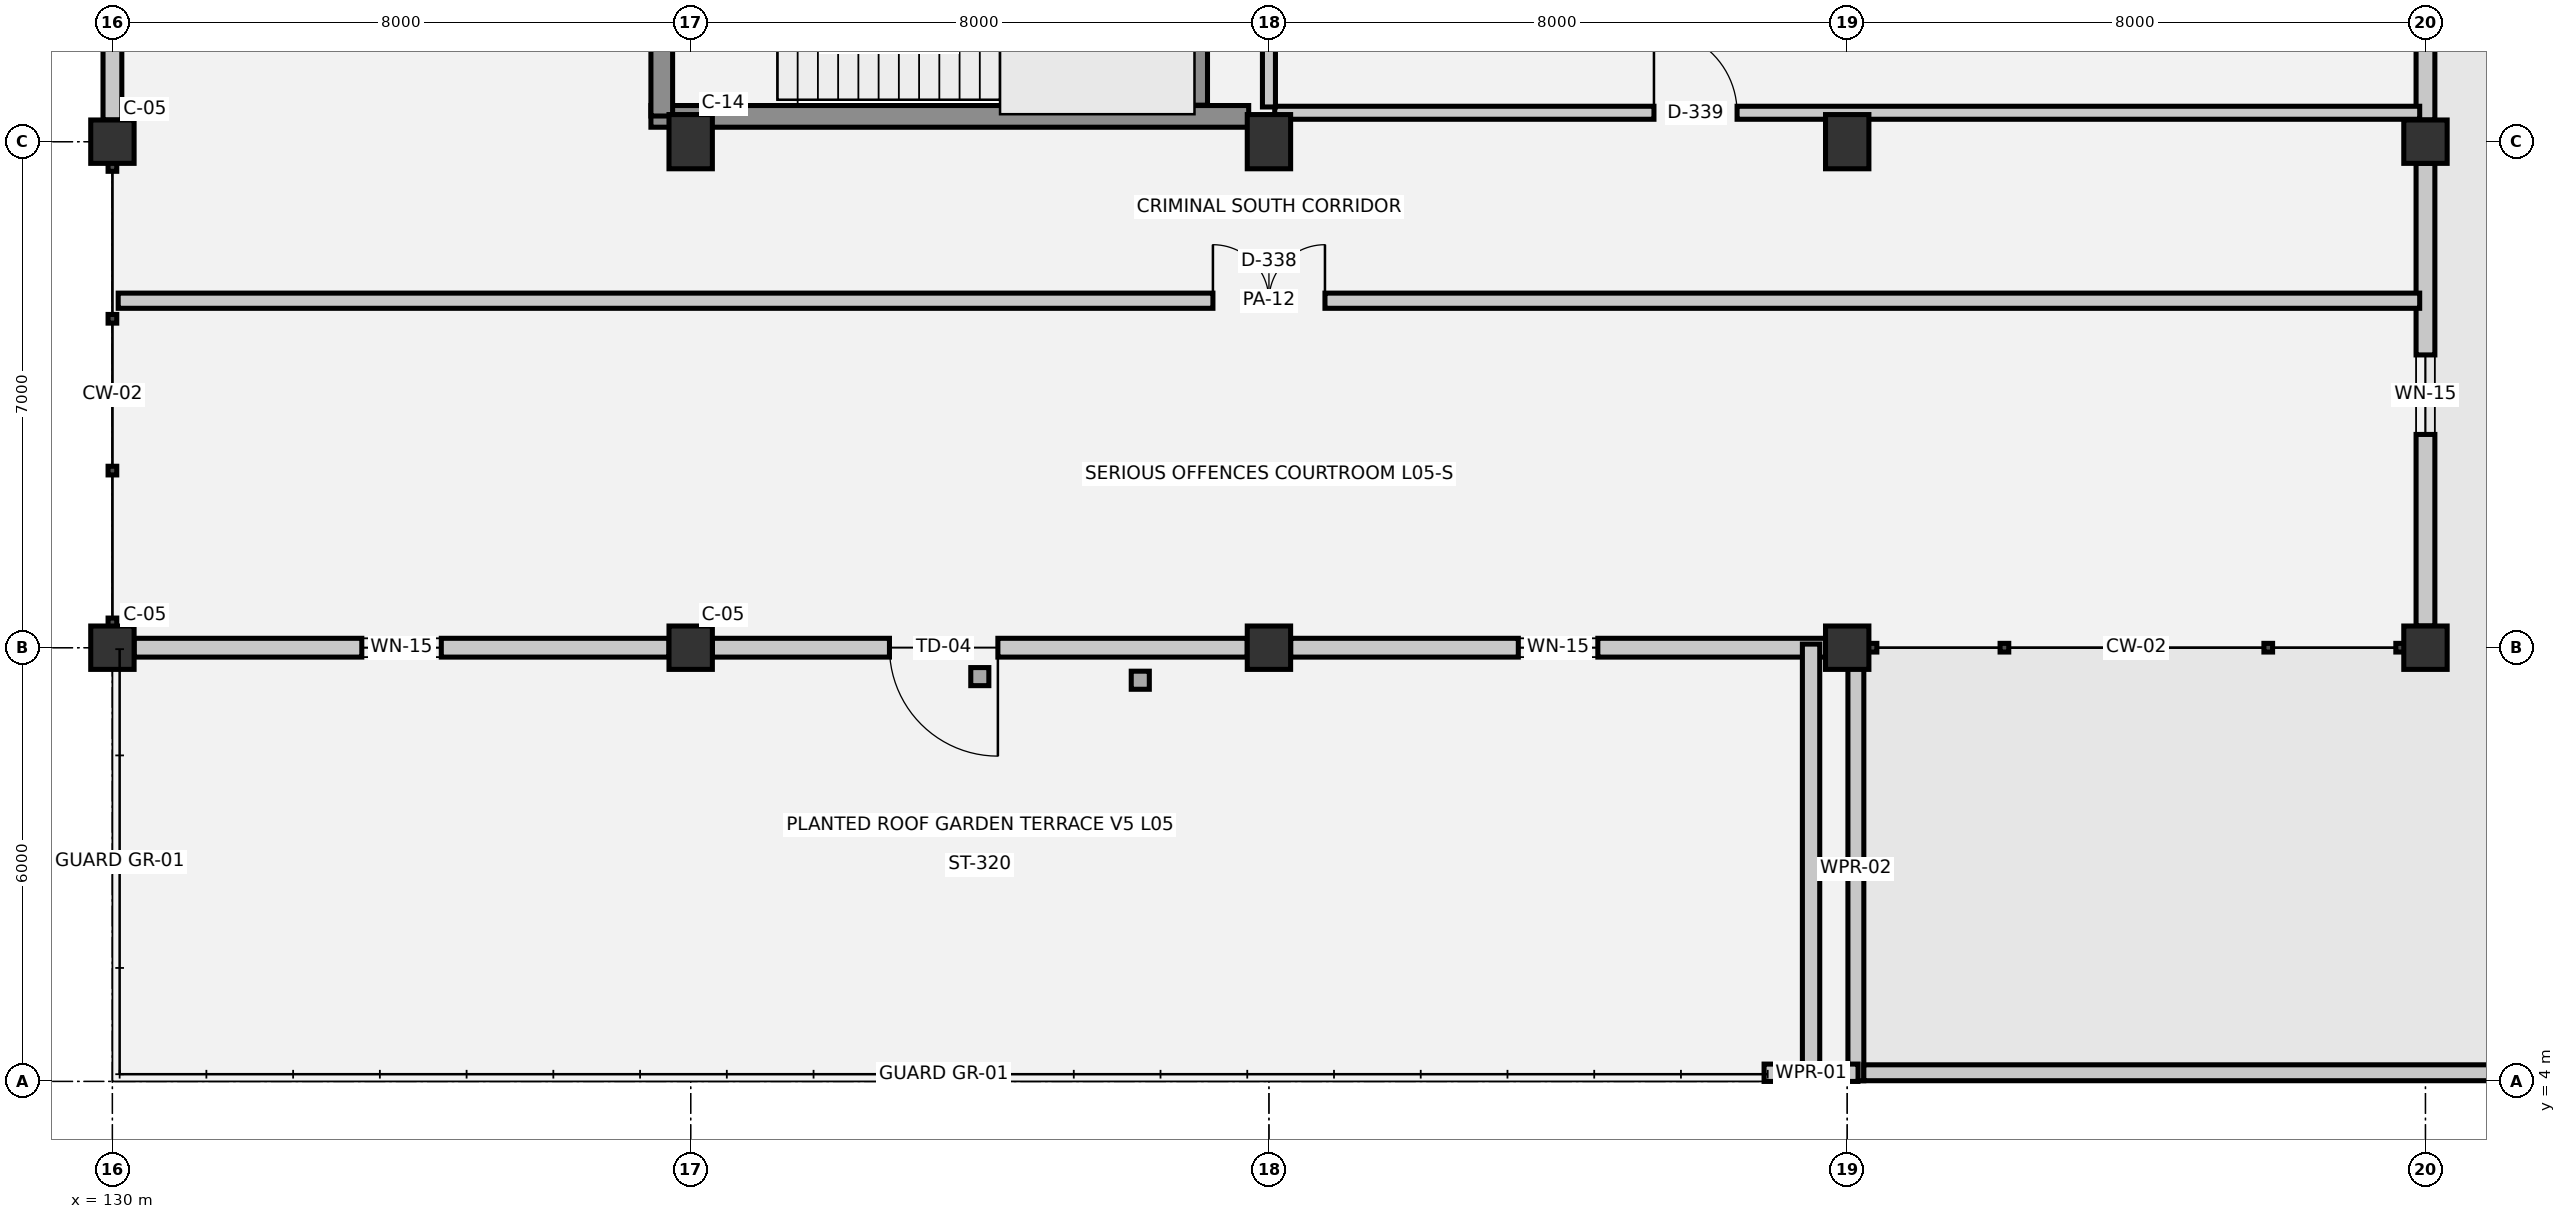
"""IFC4 building model, lengths in metres.
Left out: names, types, materials, properties, quantities, classifications, styles, units other than length and angle.
Written with IfcOpenShell. Run it as: python <this file> out.ifc"""

import sys

from ifc_helpers import new_model, si_unit, direction, frame, frame_2d, origin, origin_2d, place, context, subcontext, project, spatial, rectangle, extrude, element, fill, save


model = new_model("IFC4")
c1 = context("Model", 3, precision=1e-05, world=origin(), true_north=direction((0.0, 1.0)))
c2 = subcontext(c1, "Body", "Model", "MODEL_VIEW")
j1 = project(units=[si_unit("LENGTHUNIT", "METRE"), si_unit("PLANEANGLEUNIT", "RADIAN")], contexts=[c1])
p1 = place(None, origin())
s1 = spatial("IfcSite", under=j1, at=p1, CompositionType="ELEMENT")
p2 = place(p1, origin())
s2 = spatial("IfcBuilding", under=s1, at=p2, CompositionType="ELEMENT")
p3 = place(p2, frame((0.0, 0.0, 18.3)))
s3 = spatial("IfcBuildingStorey", under=s2, at=p3, CompositionType="ELEMENT", Elevation=18.3)
for number, where, z_axis, x_axis in (
    (1, (130.0, 10.0, 0.0), (0.0, 0.0, 1.0), (1.0, 0.0, 0.0)),
    (2, (130.0, 17.0, 0.0), (0.0, 0.0, 1.0), (1.0, 0.0, 0.0)),
    (3, (138.0, 10.0, 0.0), (0.0, 0.0, 1.0), (1.0, 0.0, 0.0)),
):
    element("IfcColumn", number, at=place(p3, frame(where, z_axis=z_axis, x_axis=x_axis)), inside=s3, PredefinedType="COLUMN", context=c2, shape_type="SweptSolid", body=[
        extrude(rectangle(XDim=0.6, YDim=0.6, at=origin_2d()), origin(), (0.0, 0.0, 1.0), 3.75),
    ])
p4 = place(p3, frame((138.0, 17.0, 0.0), z_axis=(0.0, 0.0, 1.0), x_axis=(1.0, 0.0, 0.0)))
e4 = element("IfcColumn", 4, at=p4, inside=s3, PredefinedType="COLUMN", context=c2, shape_type="SweptSolid", body=[
    extrude(rectangle(XDim=0.6, YDim=0.75, at=origin_2d()), origin(), (0.0, 0.0, 1.0), 3.75),
])
p5 = place(p3, frame((146.0, 10.0, 0.0), z_axis=(0.0, 0.0, 1.0), x_axis=(1.0, 0.0, 0.0)))
e5 = element("IfcColumn", 5, at=p5, inside=s3, PredefinedType="COLUMN", context=c2, shape_type="SweptSolid", body=[
    extrude(rectangle(XDim=0.6, YDim=0.6, at=origin_2d()), origin(), (0.0, 0.0, 1.0), 3.75),
])
p6 = place(p3, frame((146.0, 17.0, 0.0), z_axis=(0.0, 0.0, 1.0), x_axis=(1.0, 0.0, 0.0)))
e6 = element("IfcColumn", 6, at=p6, inside=s3, PredefinedType="COLUMN", context=c2, shape_type="SweptSolid", body=[
    extrude(rectangle(XDim=0.6, YDim=0.75, at=origin_2d()), origin(), (0.0, 0.0, 1.0), 3.75),
])
p7 = place(p3, frame((154.0, 10.0, 0.0), z_axis=(0.0, 0.0, 1.0), x_axis=(1.0, 0.0, 0.0)))
e7 = element("IfcColumn", 7, at=p7, inside=s3, PredefinedType="COLUMN", context=c2, shape_type="SweptSolid", body=[
    extrude(rectangle(XDim=0.6, YDim=0.6, at=origin_2d()), origin(), (0.0, 0.0, 1.0), 3.75),
])
p8 = place(p3, frame((154.0, 17.0, 0.0), z_axis=(0.0, 0.0, 1.0), x_axis=(1.0, 0.0, 0.0)))
e8 = element("IfcColumn", 8, at=p8, inside=s3, PredefinedType="COLUMN", context=c2, shape_type="SweptSolid", body=[
    extrude(rectangle(XDim=0.6, YDim=0.75, at=origin_2d()), origin(), (0.0, 0.0, 1.0), 3.75),
])
for number, where, z_axis, x_axis in (
    (9, (162.0, 10.0, 0.0), (0.0, 0.0, 1.0), (1.0, 0.0, 0.0)),
    (10, (162.0, 17.0, 0.0), (0.0, 0.0, 1.0), (1.0, 0.0, 0.0)),
):
    element("IfcColumn", number, at=place(p3, frame(where, z_axis=z_axis, x_axis=x_axis)), inside=s3, PredefinedType="COLUMN", context=c2, shape_type="SweptSolid", body=[
        extrude(rectangle(XDim=0.6, YDim=0.6, at=origin_2d()), origin(), (0.0, 0.0, 1.0), 3.75),
    ])
p9 = place(p3, frame((130.0, 17.3, 0.0), z_axis=(0.0, 0.0, 1.0), x_axis=(0.0, 1.0, 0.0)))
e11 = element("IfcWall", 11, at=p9, inside=s3, PredefinedType="SOLIDWALL", context=c2, shape_type="SweptSolid", body=[
    extrude(rectangle(XDim=7.4, YDim=0.26, at=frame_2d((3.7, 0.0))), origin(), (0.0, 0.0, 1.0), 2.55),
])
p10 = place(p9, frame((3.15, 0.0, 0.9)))
e12 = element("IfcOpeningElement", 12, at=p10, cuts=e11, PredefinedType="OPENING", context=c2, shape_type="SweptSolid", body=[
    extrude(rectangle(XDim=1.1, YDim=1.2, at=frame_2d((0.55, 0.6))), frame((0.0, 0.14, 0.0), z_axis=(0.0, -1.0, 0.0), x_axis=(1.0, 0.0, 0.0)), (0.0, 0.0, 1.0), 0.28),
])
p11 = place(p3, frame((162.0, 24.7, 0.0), z_axis=(0.0, 0.0, 1.0), x_axis=(0.0, -1.0, 0.0)))
e13 = element("IfcWall", 13, at=p11, inside=s3, PredefinedType="SOLIDWALL", context=c2, shape_type="SweptSolid", body=[
    extrude(rectangle(XDim=7.4, YDim=0.26, at=frame_2d((3.7, 0.0))), origin(), (0.0, 0.0, 1.0), 2.55),
])
p12 = place(p11, frame((3.15, 0.0, 1.0)))
e14 = element("IfcOpeningElement", 14, at=p12, cuts=e13, PredefinedType="OPENING", context=c2, shape_type="SweptSolid", body=[
    extrude(rectangle(XDim=1.1, YDim=1.2, at=frame_2d((0.55, 0.6))), frame((0.0, 0.14, 0.0), z_axis=(0.0, -1.0, 0.0), x_axis=(1.0, 0.0, 0.0)), (0.0, 0.0, 1.0), 0.28),
])
p13 = place(p3, frame((162.0, 16.7, 0.0), z_axis=(0.0, 0.0, 1.0), x_axis=(0.0, -1.0, 0.0)))
e15 = element("IfcWall", 15, at=p13, inside=s3, PredefinedType="SOLIDWALL", context=c2, shape_type="SweptSolid", body=[
    extrude(rectangle(XDim=6.4, YDim=0.26, at=frame_2d((3.2, 0.0))), origin(), (0.0, 0.0, 1.0), 2.55),
])
p14 = place(p13, frame((2.65, 0.0, 1.0)))
e16 = element("IfcOpeningElement", 16, at=p14, cuts=e15, PredefinedType="OPENING", context=c2, shape_type="SweptSolid", body=[
    extrude(rectangle(XDim=1.1, YDim=1.2, at=frame_2d((0.55, 0.6))), frame((0.0, 0.14, 0.0), z_axis=(0.0, -1.0, 0.0), x_axis=(1.0, 0.0, 0.0)), (0.0, 0.0, 1.0), 0.28),
])
p15 = place(p3, frame((153.7, 10.0, 0.0), z_axis=(0.0, 0.0, 1.0), x_axis=(-1.0, 0.0, 0.0)))
e17 = element("IfcWall", 17, at=p15, inside=s3, PredefinedType="SOLIDWALL", context=c2, shape_type="SweptSolid", body=[
    extrude(rectangle(XDim=7.4, YDim=0.26, at=frame_2d((3.7, 0.0))), origin(), (0.0, 0.0, 1.0), 2.55),
])
p16 = place(p15, frame((3.15, 0.0, 0.9)))
e18 = element("IfcOpeningElement", 18, at=p16, cuts=e17, PredefinedType="OPENING", context=c2, shape_type="SweptSolid", body=[
    extrude(rectangle(XDim=1.1, YDim=1.2, at=frame_2d((0.55, 0.6))), frame((0.0, 0.14, 0.0), z_axis=(0.0, -1.0, 0.0), x_axis=(1.0, 0.0, 0.0)), (0.0, 0.0, 1.0), 0.28),
])
p17 = place(p3, frame((145.7, 10.0, 0.0), z_axis=(0.0, 0.0, 1.0), x_axis=(-1.0, 0.0, 0.0)))
e19 = element("IfcWall", 19, at=p17, inside=s3, PredefinedType="SOLIDWALL", context=c2, shape_type="SweptSolid", body=[
    extrude(rectangle(XDim=7.4, YDim=0.26, at=frame_2d((3.7, 0.0))), origin(), (0.0, 0.0, 1.0), 2.55),
])
p18 = place(p17, frame((3.45, 0.0, 0.0)))
e20 = element("IfcOpeningElement", 20, at=p18, cuts=e19, PredefinedType="OPENING", context=c2, shape_type="SweptSolid", body=[
    extrude(rectangle(XDim=1.5, YDim=2.2, at=frame_2d((0.75, 1.1))), frame((0.0, 0.14, 0.0), z_axis=(0.0, -1.0, 0.0), x_axis=(1.0, 0.0, 0.0)), (0.0, 0.0, 1.0), 0.28),
])
p19 = place(p3, frame((137.7, 10.0, 0.0), z_axis=(0.0, 0.0, 1.0), x_axis=(-1.0, 0.0, 0.0)))
e21 = element("IfcWall", 21, at=p19, inside=s3, PredefinedType="SOLIDWALL", context=c2, shape_type="SweptSolid", body=[
    extrude(rectangle(XDim=7.4, YDim=0.26, at=frame_2d((3.7, 0.0))), origin(), (0.0, 0.0, 1.0), 2.55),
])
p20 = place(p19, frame((3.15, 0.0, 0.9)))
e22 = element("IfcOpeningElement", 22, at=p20, cuts=e21, PredefinedType="OPENING", context=c2, shape_type="SweptSolid", body=[
    extrude(rectangle(XDim=1.1, YDim=1.2, at=frame_2d((0.55, 0.6))), frame((0.0, 0.14, 0.0), z_axis=(0.0, -1.0, 0.0), x_axis=(1.0, 0.0, 0.0)), (0.0, 0.0, 1.0), 0.28),
])
p21 = place(p3, frame((154.12, 4.01, 0.0), z_axis=(0.0, 0.0, 1.0), x_axis=(0.0, 1.0, 0.0)))
e23 = element("IfcWall", 23, at=p21, inside=s3, PredefinedType="PARAPET", context=c2, shape_type="SweptSolid", body=[
    extrude(rectangle(XDim=5.87, YDim=0.22, at=frame_2d((2.935, 0.0))), origin(), (0.0, 0.0, 1.0), 1.12),
])
p22 = place(p3, frame((169.77, 4.12, 0.0), z_axis=(0.0, 0.0, 1.0), x_axis=(-1.0, 0.0, 0.0)))
e24 = element("IfcWall", 24, at=p22, inside=s3, PredefinedType="PARAPET", context=c2, shape_type="SweptSolid", body=[
    extrude(rectangle(XDim=15.54, YDim=0.22, at=frame_2d((7.77, 0.0))), origin(), (0.0, 0.0, 1.0), 1.12),
])
p23 = place(p3, frame((152.85, 4.12, 0.0), z_axis=(0.0, 0.0, 1.0), x_axis=(1.0, 0.0, 0.0)))
e25 = element("IfcWall", 25, at=p23, inside=s3, PredefinedType="PARAPET", context=c2, shape_type="SweptSolid", body=[
    extrude(rectangle(XDim=1.3, YDim=0.24, at=frame_2d((0.65, 0.0))), origin(), (0.0, 0.0, 1.0), 1.12),
])
p24 = place(p3, frame((153.5, 4.12, 0.0), z_axis=(0.0, 0.0, 1.0), x_axis=(0.0, 1.0, 0.0)))
e26 = element("IfcWall", 26, at=p24, inside=s3, PredefinedType="PARAPET", context=c2, shape_type="SweptSolid", body=[
    extrude(rectangle(XDim=5.93, YDim=0.24, at=frame_2d((2.965, 0.0))), origin(), (0.0, 0.0, 1.0), 1.12),
])
p25 = place(p3, frame((137.45, 17.35, 0.0), z_axis=(0.0, 0.0, 1.0), x_axis=(1.0, 0.0, 0.0)))
e27 = element("IfcWall", 27, at=p25, inside=s3, PredefinedType="SHEAR", context=c2, shape_type="SweptSolid", body=[
    extrude(rectangle(XDim=8.27, YDim=0.3, at=frame_2d((4.135, 0.0))), origin(), (0.0, 0.0, 1.0), 3.47),
])
p26 = place(p3, frame((137.6, 21.495, 0.0), z_axis=(0.0, 0.0, 1.0), x_axis=(0.0, -1.0, 0.0)))
e28 = element("IfcWall", 28, at=p26, inside=s3, PredefinedType="SHEAR", context=c2, shape_type="SweptSolid", body=[
    extrude(rectangle(XDim=4.14, YDim=0.3, at=frame_2d((2.07, 0.0))), origin(), (0.0, 0.0, 1.0), 3.47),
])
p27 = place(p3, frame((145.0, 17.505, 0.0), z_axis=(0.0, 0.0, 1.0), x_axis=(0.0, 1.0, 0.0)))
e29 = element("IfcWall", 29, at=p27, inside=s3, PredefinedType="SHEAR", context=c2, shape_type="SweptSolid", body=[
    extrude(rectangle(XDim=3.99, YDim=0.3, at=frame_2d((1.995, 0.0))), origin(), (0.0, 0.0, 1.0), 3.47),
])
p28 = place(p3, frame((130.08, 14.8, 0.0), z_axis=(0.0, 0.0, 1.0), x_axis=(1.0, 0.0, 0.0)))
e30 = element("IfcWall", 30, at=p28, inside=s3, PredefinedType="PARTITIONING", context=c2, shape_type="SweptSolid", body=[
    extrude(rectangle(XDim=31.84, YDim=0.21, at=frame_2d((15.92, 0.0))), origin(), (0.0, 0.0, 1.0), 3.39),
])
p29 = place(p28, frame((15.145, 0.0, 0.0)))
e31 = element("IfcOpeningElement", 31, at=p29, cuts=e30, PredefinedType="OPENING", context=c2, shape_type="SweptSolid", body=[
    extrude(rectangle(XDim=1.55, YDim=2.25, at=frame_2d((0.775, 1.125))), frame((0.0, 0.115, 0.0), z_axis=(0.0, -1.0, 0.0), x_axis=(1.0, 0.0, 0.0)), (0.0, 0.0, 1.0), 0.23),
])
p30 = place(p3, frame((146.08, 17.4, 0.0), z_axis=(0.0, 0.0, 1.0), x_axis=(1.0, 0.0, 0.0)))
e32 = element("IfcWall", 32, at=p30, inside=s3, PredefinedType="PARTITIONING", context=c2, shape_type="SweptSolid", body=[
    extrude(rectangle(XDim=15.84, YDim=0.18, at=frame_2d((7.92, 0.0))), origin(), (0.0, 0.0, 1.0), 3.39),
])
p31 = place(p30, frame((5.247, 0.0, 0.0)))
e33 = element("IfcOpeningElement", 33, at=p31, cuts=e32, PredefinedType="OPENING", context=c2, shape_type="SweptSolid", body=[
    extrude(rectangle(XDim=1.15, YDim=2.2, at=frame_2d((0.575, 1.1))), frame((0.0, 0.1, 0.0), z_axis=(0.0, -1.0, 0.0), x_axis=(1.0, 0.0, 0.0)), (0.0, 0.0, 1.0), 0.2),
])
p32 = place(p3, frame((146.0, 17.48, 0.0), z_axis=(0.0, 0.0, 1.0), x_axis=(0.0, 1.0, 0.0)))
e34 = element("IfcWall", 34, at=p32, inside=s3, PredefinedType="PARTITIONING", context=c2, shape_type="SweptSolid", body=[
    extrude(rectangle(XDim=7.44, YDim=0.18, at=frame_2d((3.72, 0.0))), origin(), (0.0, 0.0, 1.0), 2.57),
])
p33 = place(p14, origin())
e35 = element("IfcWindow", 35, at=p33, inside=s3, PartitioningType="SINGLE_PANEL", PredefinedType="WINDOW", context=c2, shape_type="SweptSolid", body=[
    extrude(rectangle(XDim=1.1, YDim=1.2, at=frame_2d((0.55, 0.6))), frame((0.0, 0.03, 0.0), z_axis=(0.0, -1.0, 0.0), x_axis=(1.0, 0.0, 0.0)), (0.0, 0.0, 1.0), 0.06),
])
fill(e16, e35)
p34 = place(p16, origin())
e36 = element("IfcWindow", 36, at=p34, inside=s3, PartitioningType="SINGLE_PANEL", PredefinedType="WINDOW", context=c2, shape_type="SweptSolid", body=[
    extrude(rectangle(XDim=1.1, YDim=1.2, at=frame_2d((0.55, 0.6))), frame((0.0, 0.03, 0.0), z_axis=(0.0, -1.0, 0.0), x_axis=(1.0, 0.0, 0.0)), (0.0, 0.0, 1.0), 0.06),
])
fill(e18, e36)
p35 = place(p18, origin())
e37 = element("IfcDoor", 37, at=p35, inside=s3, OperationType="SINGLE_SWING_LEFT", PredefinedType="DOOR", context=c2, shape_type="SweptSolid", body=[
    extrude(rectangle(XDim=1.5, YDim=2.2, at=frame_2d((0.75, 1.1))), frame((0.0, 0.025, 0.0), z_axis=(0.0, -1.0, 0.0), x_axis=(1.0, 0.0, 0.0)), (0.0, 0.0, 1.0), 0.05),
])
fill(e20, e37)
p36 = place(p20, origin())
e38 = element("IfcWindow", 38, at=p36, inside=s3, PartitioningType="SINGLE_PANEL", PredefinedType="WINDOW", context=c2, shape_type="SweptSolid", body=[
    extrude(rectangle(XDim=1.1, YDim=1.2, at=frame_2d((0.55, 0.6))), frame((0.0, 0.03, 0.0), z_axis=(0.0, -1.0, 0.0), x_axis=(1.0, 0.0, 0.0)), (0.0, 0.0, 1.0), 0.06),
])
fill(e22, e38)
p37 = place(p29, origin())
e39 = element("IfcDoor", 39, at=p37, inside=s3, OperationType="DOUBLE_DOOR_SINGLE_SWING", PredefinedType="DOOR", context=c2, shape_type="SweptSolid", body=[
    extrude(rectangle(XDim=1.55, YDim=2.25, at=frame_2d((0.775, 1.125))), frame((0.0, 0.025, 0.0), z_axis=(0.0, -1.0, 0.0), x_axis=(1.0, 0.0, 0.0)), (0.0, 0.0, 1.0), 0.05),
])
fill(e31, e39)
p38 = place(p31, origin())
e40 = element("IfcDoor", 40, at=p38, inside=s3, OperationType="SINGLE_SWING_LEFT", PredefinedType="DOOR", context=c2, shape_type="SweptSolid", body=[
    extrude(rectangle(XDim=1.15, YDim=2.2, at=frame_2d((0.575, 1.1))), frame((0.0, 0.025, 0.0), z_axis=(0.0, -1.0, 0.0), x_axis=(1.0, 0.0, 0.0)), (0.0, 0.0, 1.0), 0.05),
])
fill(e33, e40)
save(model, sys.argv[1])
